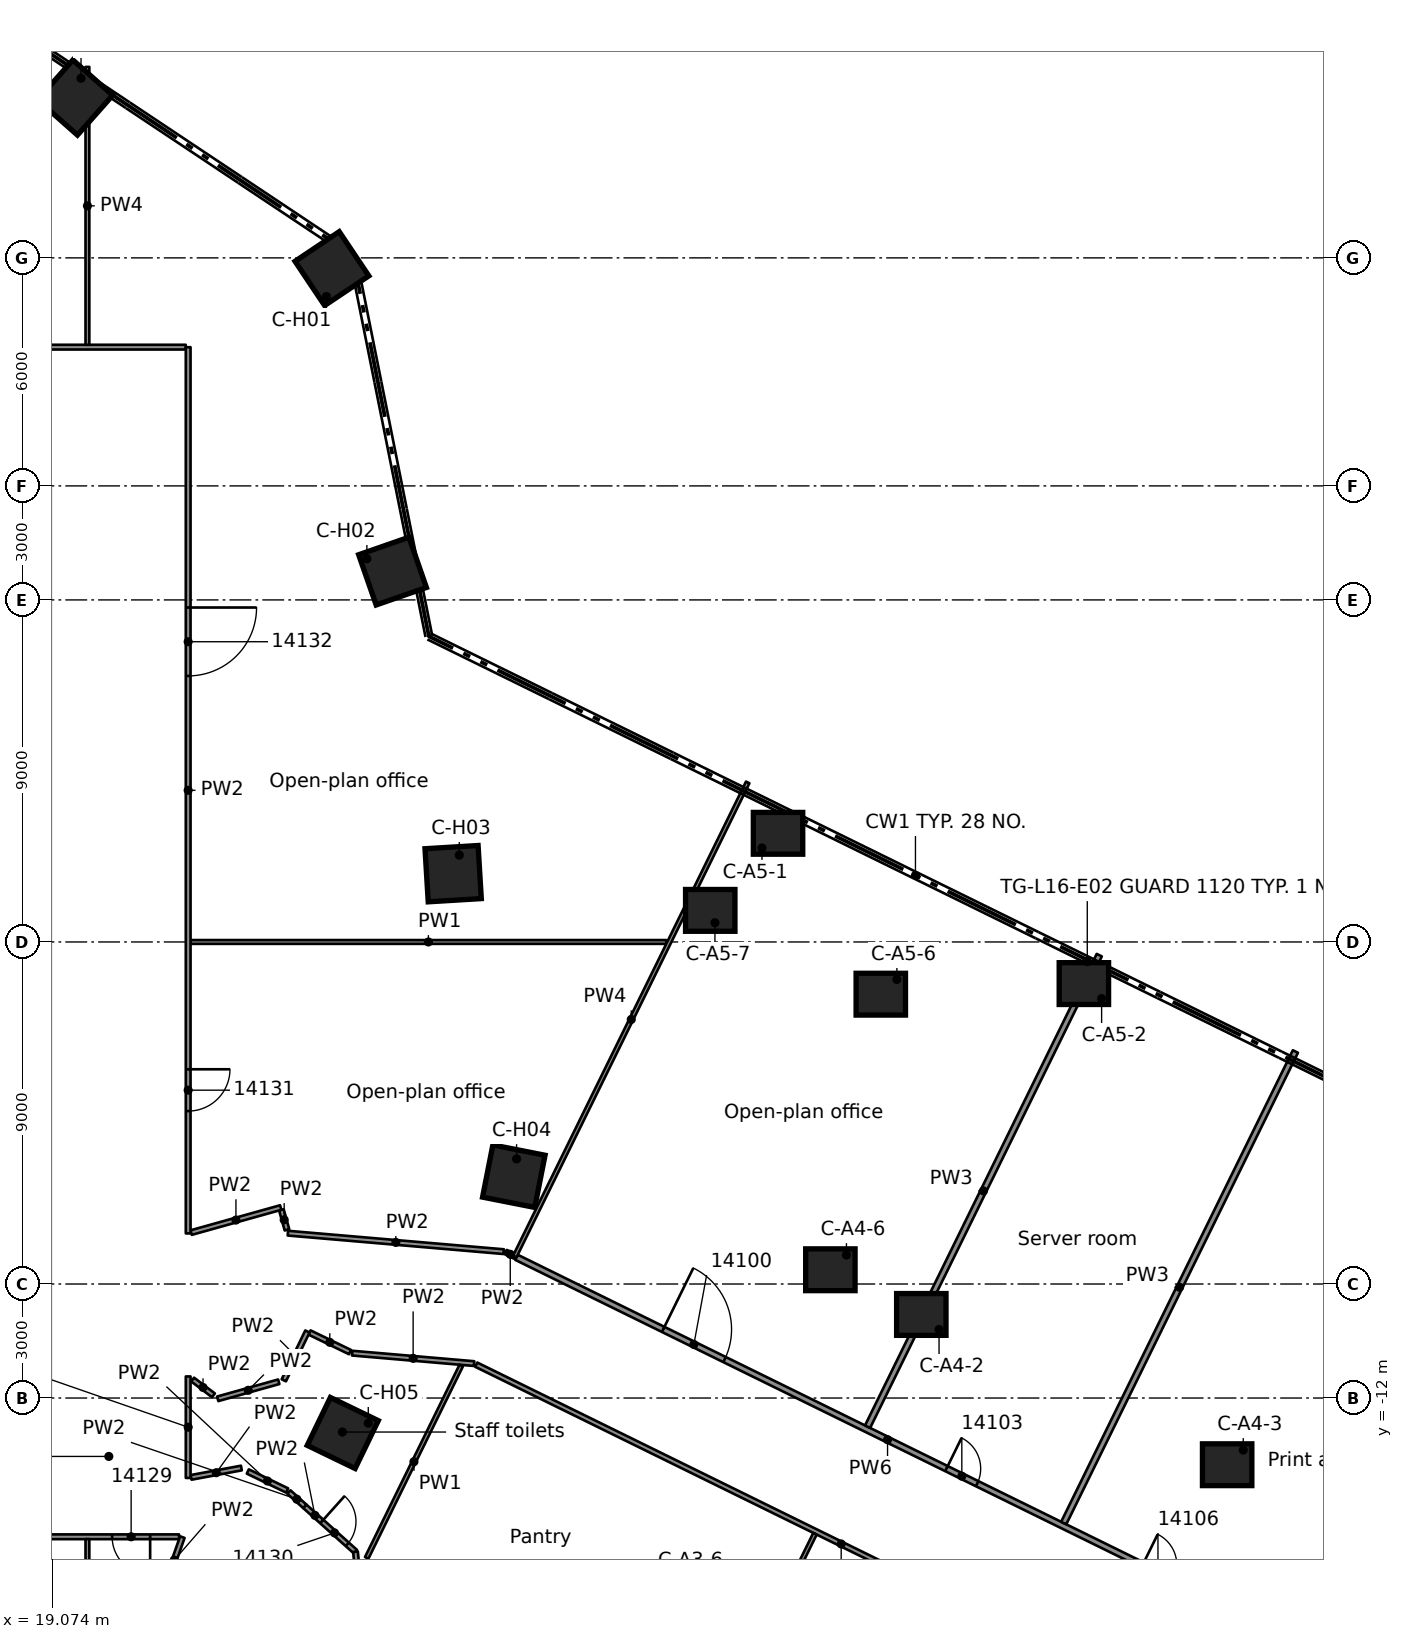
"""IFC4 building model, lengths in metres.
Left out: names, types, materials, properties, quantities, classifications, styles, units other than length and angle.
Written with IfcOpenShell. Run it as: python <this file> out.ifc"""

import sys

from ifc_helpers import new_model, si_unit, direction, frame, frame_2d, origin, origin_2d, place, context, subcontext, project, spatial, rectangle, extrude, element, fill, save


model = new_model("IFC4")
c1 = context("Model", 3, precision=1e-05, world=origin(), true_north=direction((0.0, 1.0)))
c2 = subcontext(c1, "Body", "Model", "MODEL_VIEW")
j1 = project(units=[si_unit("LENGTHUNIT", "METRE"), si_unit("PLANEANGLEUNIT", "RADIAN")], contexts=[c1])
p1 = place(None, origin())
s1 = spatial("IfcSite", under=j1, at=p1, CompositionType="ELEMENT")
p2 = place(p1, origin())
s2 = spatial("IfcBuilding", under=s1, at=p2, CompositionType="ELEMENT")
p3 = place(p2, frame((0.0, 0.0, 69.3)))
s3 = spatial("IfcBuildingStorey", under=s2, at=p3, CompositionType="ELEMENT", Elevation=69.3)
for number, where, z_axis, x_axis in (
    (1, (41.943, -9.801, 0.0), (0.0, 0.0, 1.0), (1.0, 0.0, 0.0)),
    (2, (49.991, -13.755, 0.0), (0.0, 0.0, 1.0), (1.0, 0.0, 0.0)),
    (3, (39.55, -8.625, 0.0), (0.0, 0.0, 1.0), (1.0, 0.0, 0.0)),
    (4, (38.173, 2.859, 0.0), (0.0, 0.0, 1.0), (1.0, 0.0, 0.0)),
    (5, (46.221, -1.095, 0.0), (0.0, 0.0, 1.0), (1.0, 0.0, 0.0)),
    (6, (40.877, -1.374, 0.0), (0.0, 0.0, 1.0), (1.0, 0.0, 0.0)),
    (7, (36.389, 0.831, 0.0), (0.0, 0.0, 1.0), (1.0, 0.0, 0.0)),
):
    element("IfcColumn", number, at=place(p3, frame(where, z_axis=z_axis, x_axis=x_axis)), inside=s3, PredefinedType="COLUMN", context=c2, shape_type="SweptSolid", body=[
        extrude(rectangle(XDim=1.3, YDim=1.1, at=origin_2d()), origin(), (0.0, 0.0, 1.0), 3.5),
    ])
for number, where, z_axis, x_axis in (
    (8, (26.434, 17.718, 0.0), (0.0, 0.0, 1.0), (0.831, 0.557, 0.0)),
    (9, (28.029, 9.758, 0.0), (0.0, 0.0, 1.0), (0.944, 0.329, 0.0)),
    (10, (29.624, 1.797, 0.0), (0.0, 0.0, 1.0), (0.998, 0.061, 0.0)),
    (11, (31.22, -6.163, 0.0), (0.0, 0.0, 1.0), (0.981, -0.194, 0.0)),
    (12, (26.719, -12.92, 0.0), (0.0, 0.0, 1.0), (0.9, -0.435, 0.0)),
    (13, (19.677, 22.219, 0.0), (0.0, 0.0, 1.0), (0.663, 0.749, 0.0)),
):
    element("IfcColumn", number, at=place(p3, frame(where, z_axis=z_axis, x_axis=x_axis)), inside=s3, PredefinedType="COLUMN", context=c2, shape_type="SweptSolid", body=[
        extrude(rectangle(XDim=1.4, YDim=1.4, at=origin_2d()), origin(), (0.0, 0.0, 1.0), 3.5),
    ])
p4 = place(p3, frame((25.104, -7.048, 0.0), z_axis=(0.0, 0.0, 1.0), x_axis=(0.268702664175, -0.963223171578, 0.0)))
e14 = element("IfcWall", 14, at=p4, inside=s3, PredefinedType="PARTITIONING", context=c2, shape_type="SweptSolid", body=[
    extrude(rectangle(XDim=0.547, YDim=0.125, at=frame_2d((0.273, 0.0))), origin(), (0.0, 0.0, 1.0), 3.03),
])
p5 = place(p3, frame((25.72, -14.849, 0.0), z_axis=(0.0, 0.0, 1.0), x_axis=(0.744891794115, -0.667185292899, 0.0)))
e15 = element("IfcWall", 15, at=p5, inside=s3, PredefinedType="PARTITIONING", context=c2, shape_type="SweptSolid", body=[
    extrude(rectangle(XDim=1.791, YDim=0.125, at=frame_2d((0.896, 0.0))), origin(), (0.0, 0.0, 1.0), 3.03),
])
p6 = place(p5, frame((0.6, 0.0, 0.0)))
e16 = element("IfcOpeningElement", 16, at=p6, cuts=e15, PredefinedType="OPENING", context=c2, shape_type="SweptSolid", body=[
    extrude(rectangle(XDim=0.9, YDim=2.1, at=frame_2d((0.45, 1.05))), frame((0.0, 0.073, 0.0), z_axis=(0.0, -1.0, 0.0), x_axis=(1.0, 0.0, 0.0)), (0.0, 0.0, 1.0), 0.145),
])
p7 = place(p3, frame((25.302, -14.475, 0.0), z_axis=(0.0, 0.0, 1.0), x_axis=(0.745195775022, -0.666845751947, 0.0)))
e17 = element("IfcWall", 17, at=p7, inside=s3, PredefinedType="PARTITIONING", context=c2, shape_type="SweptSolid", body=[
    extrude(rectangle(XDim=0.561, YDim=0.125, at=frame_2d((0.28, 0.0))), origin(), (0.0, 0.0, 1.0), 3.03),
])
p8 = place(p3, frame((22.768, -11.514, 0.0), z_axis=(0.0, 0.0, 1.0), x_axis=(0.797092148154, -0.603857687995, 0.0)))
e18 = element("IfcWall", 18, at=p8, inside=s3, PredefinedType="PARTITIONING", context=c2, shape_type="SweptSolid", body=[
    extrude(rectangle(XDim=0.687, YDim=0.125, at=frame_2d((0.344, 0.0))), origin(), (0.0, 0.0, 1.0), 3.03),
])
p9 = place(p3, frame((49.438, -20.558, 0.0), z_axis=(0.0, 0.0, 1.0), x_axis=(-0.897535791299, 0.440941609896, 0.0)))
e19 = element("IfcWall", 19, at=p9, inside=s3, PredefinedType="PARTITIONING", context=c2, shape_type="SweptSolid", body=[
    extrude(rectangle(XDim=21.4, YDim=0.125, at=frame_2d((10.7, 0.0))), origin(), (0.0, 0.0, 1.0), 3.03),
])
p10 = place(p9, frame((5.288, 0.0, 0.0)))
e20 = element("IfcOpeningElement", 20, at=p10, cuts=e19, PredefinedType="OPENING", context=c2, shape_type="SweptSolid", body=[
    extrude(rectangle(XDim=0.9, YDim=2.1, at=frame_2d((0.45, 1.05))), frame((0.0, 0.073, 0.0), z_axis=(0.0, -1.0, 0.0), x_axis=(1.0, 0.0, 0.0)), (0.0, 0.0, 1.0), 0.145),
])
p11 = place(p3, frame((31.291, -8.298, 0.0), z_axis=(0.0, 0.0, 1.0), x_axis=(0.897505006542, -0.441004266683, 0.0)))
e21 = element("IfcWall", 21, at=p11, inside=s3, PredefinedType="PARTITIONING", context=c2, shape_type="SweptSolid", body=[
    extrude(rectangle(XDim=21.757, YDim=0.15, at=frame_2d((10.878, 0.0))), origin(), (0.0, 0.0, 1.0), 3.03),
])
p12 = place(p11, frame((4.3, 0.0, 0.0)))
e22 = element("IfcOpeningElement", 22, at=p12, cuts=e21, PredefinedType="OPENING", context=c2, shape_type="SweptSolid", body=[
    extrude(rectangle(XDim=1.8, YDim=2.1, at=frame_2d((0.9, 1.05))), frame((0.0, 0.085, 0.0), z_axis=(0.0, -1.0, 0.0), x_axis=(1.0, 0.0, 0.0)), (0.0, 0.0, 1.0), 0.17),
])
p13 = place(p11, frame((12.606, 0.0, 0.0)))
e23 = element("IfcOpeningElement", 23, at=p13, cuts=e21, PredefinedType="OPENING", context=c2, shape_type="SweptSolid", body=[
    extrude(rectangle(XDim=0.9, YDim=2.1, at=frame_2d((0.45, 1.05))), frame((0.0, 0.085, 0.0), z_axis=(0.0, -1.0, 0.0), x_axis=(1.0, 0.0, 0.0)), (0.0, 0.0, 1.0), 0.17),
])
p14 = place(p11, frame((18.357, 0.0, 0.0)))
e24 = element("IfcOpeningElement", 24, at=p14, cuts=e21, PredefinedType="OPENING", context=c2, shape_type="SweptSolid", body=[
    extrude(rectangle(XDim=0.9, YDim=2.1, at=frame_2d((0.45, 1.05))), frame((0.0, 0.085, 0.0), z_axis=(0.0, -1.0, 0.0), x_axis=(1.0, 0.0, 0.0)), (0.0, 0.0, 1.0), 0.17),
])
p15 = place(p3, frame((31.007, -8.159, 0.0), z_axis=(0.0, 0.0, 1.0), x_axis=(0.898247549427, -0.439489863305, 0.0)))
e25 = element("IfcWall", 25, at=p15, inside=s3, PredefinedType="PARTITIONING", context=c2, shape_type="SweptSolid", body=[
    extrude(rectangle(XDim=0.266, YDim=0.125, at=frame_2d((0.133, 0.0))), origin(), (0.0, 0.0, 1.0), 3.03),
])
p16 = place(p3, frame((24.22, -13.933, 0.0), z_axis=(0.0, 0.0, 1.0), x_axis=(0.900419681582, -0.435022294853, 0.0)))
e26 = element("IfcWall", 26, at=p16, inside=s3, PredefinedType="PARTITIONING", context=c2, shape_type="SweptSolid", body=[
    extrude(rectangle(XDim=1.149, YDim=0.125, at=frame_2d((0.575, 0.0))), origin(), (0.0, 0.0, 1.0), 3.03),
])
p17 = place(p3, frame((25.845, -10.276, 0.0), z_axis=(0.0, 0.0, 1.0), x_axis=(0.900044500098, -0.435798001193, 0.0)))
e27 = element("IfcWall", 27, at=p17, inside=s3, PredefinedType="PARTITIONING", context=c2, shape_type="SweptSolid", body=[
    extrude(rectangle(XDim=1.184, YDim=0.125, at=frame_2d((0.592, 0.0))), origin(), (0.0, 0.0, 1.0), 3.03),
])
p18 = place(p3, frame((26.967, -10.819, 0.0), z_axis=(0.0, 0.0, 1.0), x_axis=(0.99634849222, -0.085379634874, 0.0)))
e28 = element("IfcWall", 28, at=p18, inside=s3, PredefinedType="PARTITIONING", context=c2, shape_type="SweptSolid", body=[
    extrude(rectangle(XDim=3.22, YDim=0.125, at=frame_2d((1.61, 0.0))), origin(), (0.0, 0.0, 1.0), 3.03),
])
p19 = place(p3, frame((25.275, -7.662, 0.0), z_axis=(0.0, 0.0, 1.0), x_axis=(0.996348730604, -0.085376852979, 0.0)))
e29 = element("IfcWall", 29, at=p19, inside=s3, PredefinedType="PARTITIONING", context=c2, shape_type="SweptSolid", body=[
    extrude(rectangle(XDim=5.702, YDim=0.125, at=frame_2d((2.851, 0.0))), origin(), (0.0, 0.0, 1.0), 3.03),
])
p20 = place(p3, frame((22.412, -15.651, 0.0), z_axis=(0.0, 0.0, 1.0), x_axis=(-1.0, 0.0, 0.0)))
e30 = element("IfcWall", 30, at=p20, inside=s3, PredefinedType="PARTITIONING", context=c2, shape_type="SweptSolid", body=[
    extrude(rectangle(XDim=10.252, YDim=0.125, at=frame_2d((5.126, 0.0))), origin(), (0.0, 0.0, 1.0), 3.03),
])
p21 = place(p20, frame((0.762, 0.0, 0.0)))
e31 = element("IfcOpeningElement", 31, at=p21, cuts=e30, PredefinedType="OPENING", context=c2, shape_type="SweptSolid", body=[
    extrude(rectangle(XDim=1.0, YDim=2.1, at=frame_2d((0.5, 1.05))), frame((0.0, 0.073, 0.0), z_axis=(0.0, -1.0, 0.0), x_axis=(1.0, 0.0, 0.0)), (0.0, 0.0, 1.0), 0.145),
])
p22 = place(p3, frame((22.713, 0.0, 0.0), z_axis=(0.0, 0.0, 1.0), x_axis=(1.0, 0.0, 0.0)))
e32 = element("IfcWall", 32, at=p22, inside=s3, PredefinedType="PARTITIONING", context=c2, shape_type="SweptSolid", body=[
    extrude(rectangle(XDim=12.519, YDim=0.1, at=frame_2d((6.26, 0.0))), origin(), (0.0, 0.0, 1.0), 3.03),
])
p23 = place(p3, frame((12.311, 15.651, 0.0), z_axis=(0.0, 0.0, 1.0), x_axis=(1.0, 0.0, 0.0)))
e33 = element("IfcWall", 33, at=p23, inside=s3, PredefinedType="PARTITIONING", context=c2, shape_type="SweptSolid", body=[
    extrude(rectangle(XDim=10.276, YDim=0.125, at=frame_2d((5.138, 0.0))), origin(), (0.0, 0.0, 1.0), 3.03),
])
p24 = place(p3, frame((22.729, -14.088, 0.0), z_axis=(0.0, 0.0, 1.0), x_axis=(0.983144472478, 0.182830375584, 0.0)))
e34 = element("IfcWall", 34, at=p24, inside=s3, PredefinedType="PARTITIONING", context=c2, shape_type="SweptSolid", body=[
    extrude(rectangle(XDim=1.345, YDim=0.125, at=frame_2d((0.672, 0.0))), origin(), (0.0, 0.0, 1.0), 3.03),
])
p25 = place(p3, frame((23.428, -12.021, 0.0), z_axis=(0.0, 0.0, 1.0), x_axis=(0.963114320188, 0.269092560745, 0.0)))
e35 = element("IfcWall", 35, at=p25, inside=s3, PredefinedType="PARTITIONING", context=c2, shape_type="SweptSolid", body=[
    extrude(rectangle(XDim=1.668, YDim=0.125, at=frame_2d((0.834, 0.0))), origin(), (0.0, 0.0, 1.0), 3.03),
])
p26 = place(p3, frame((22.73, -7.647, 0.0), z_axis=(0.0, 0.0, 1.0), x_axis=(0.9630417148, 0.269352288937, 0.0)))
e36 = element("IfcWall", 36, at=p26, inside=s3, PredefinedType="PARTITIONING", context=c2, shape_type="SweptSolid", body=[
    extrude(rectangle(XDim=2.446, YDim=0.125, at=frame_2d((1.223, 0.0))), origin(), (0.0, 0.0, 1.0), 3.03),
])
p27 = place(p3, frame((27.154, -17.074, 0.0), z_axis=(0.0, 0.0, 1.0), x_axis=(-0.09672377766, 0.995311263292, 0.0)))
e37 = element("IfcWall", 37, at=p27, inside=s3, PredefinedType="PARTITIONING", context=c2, shape_type="SweptSolid", body=[
    extrude(rectangle(XDim=1.035, YDim=0.125, at=frame_2d((0.518, 0.0))), origin(), (0.0, 0.0, 1.0), 3.03),
])
p28 = place(p3, frame((45.69, -15.29, 0.0), z_axis=(0.0, 0.0, 1.0), x_axis=(0.441022179243, 0.89749620468, 0.0)))
e38 = element("IfcWall", 38, at=p28, inside=s3, PredefinedType="PARTITIONING", context=c2, shape_type="SweptSolid", body=[
    extrude(rectangle(XDim=13.825, YDim=0.15, at=frame_2d((6.913, 0.0))), origin(), (0.0, 0.0, 1.0), 2.395),
])
p29 = place(p3, frame((36.246, -21.472, 0.0), z_axis=(0.0, 0.0, 1.0), x_axis=(0.440934319879, 0.897539372703, 0.0)))
e39 = element("IfcWall", 39, at=p29, inside=s3, PredefinedType="PARTITIONING", context=c2, shape_type="SweptSolid", body=[
    extrude(rectangle(XDim=6.574, YDim=0.1, at=frame_2d((3.287, 0.0))), origin(), (0.0, 0.0, 1.0), 3.03),
])
p30 = place(p3, frame((40.529, -12.754, 0.0), z_axis=(0.0, 0.0, 1.0), x_axis=(0.441035914892, 0.897489454966, 0.0)))
e40 = element("IfcWall", 40, at=p30, inside=s3, PredefinedType="PARTITIONING", context=c2, shape_type="SweptSolid", body=[
    extrude(rectangle(XDim=13.824, YDim=0.15, at=frame_2d((6.912, 0.0))), origin(), (0.0, 0.0, 1.0), 2.395),
])
p31 = place(p3, frame((27.349, -16.206, 0.0), z_axis=(0.0, 0.0, 1.0), x_axis=(0.441071560189, 0.897471937607, 0.0)))
e41 = element("IfcWall", 41, at=p31, inside=s3, PredefinedType="PARTITIONING", context=c2, shape_type="SweptSolid", body=[
    extrude(rectangle(XDim=5.638, YDim=0.1, at=frame_2d((2.819, 0.0))), origin(), (0.0, 0.0, 1.0), 3.03),
])
p32 = place(p3, frame((31.246, -8.276, 0.0), z_axis=(0.0, 0.0, 1.0), x_axis=(0.440984317846, 0.897514808465, 0.0)))
e42 = element("IfcWall", 42, at=p32, inside=s3, PredefinedType="PARTITIONING", context=c2, shape_type="SweptSolid", body=[
    extrude(rectangle(XDim=13.898, YDim=0.1, at=frame_2d((6.949, 0.0))), origin(), (0.0, 0.0, 1.0), 2.419),
])
p33 = place(p3, frame((25.168, -11.534, 0.0), z_axis=(0.0, 0.0, 1.0), x_axis=(0.435198706136, 0.900334430186, 0.0)))
e43 = element("IfcWall", 43, at=p33, inside=s3, PredefinedType="PARTITIONING", context=c2, shape_type="SweptSolid", body=[
    extrude(rectangle(XDim=1.427, YDim=0.125, at=frame_2d((0.714, 0.0))), origin(), (0.0, 0.0, 1.0), 3.03),
])
p34 = place(p3, frame((22.072, -16.868, 0.0), z_axis=(0.0, 0.0, 1.0), x_axis=(0.332590805705, 0.943071235889, 0.0)))
e44 = element("IfcWall", 44, at=p34, inside=s3, PredefinedType="PARTITIONING", context=c2, shape_type="SweptSolid", body=[
    extrude(rectangle(XDim=1.281, YDim=0.125, at=frame_2d((0.641, 0.0))), origin(), (0.0, 0.0, 1.0), 3.03),
])
p35 = place(p3, frame((22.651, -14.103, 0.0), z_axis=(0.0, 0.0, 1.0), x_axis=(0.0, 1.0, 0.0)))
e45 = element("IfcWall", 45, at=p35, inside=s3, PredefinedType="PARTITIONING", context=c2, shape_type="SweptSolid", body=[
    extrude(rectangle(XDim=2.671, YDim=0.125, at=frame_2d((1.335, 0.0))), origin(), (0.0, 0.0, 1.0), 3.03),
])
p36 = place(p3, frame((22.651, 15.65, 0.0), z_axis=(0.0, 0.0, 1.0), x_axis=(0.0, -1.0, 0.0)))
e46 = element("IfcWall", 46, at=p36, inside=s3, PredefinedType="PARTITIONING", context=c2, shape_type="SweptSolid", body=[
    extrude(rectangle(XDim=23.319, YDim=0.125, at=frame_2d((11.659, 0.0))), origin(), (0.0, 0.0, 1.0), 3.03),
])
p37 = place(p36, frame((19.0, 0.0, 0.0)))
e47 = element("IfcOpeningElement", 47, at=p37, cuts=e46, PredefinedType="OPENING", context=c2, shape_type="SweptSolid", body=[
    extrude(rectangle(XDim=1.1, YDim=2.1, at=frame_2d((0.55, 1.05))), frame((0.0, 0.073, 0.0), z_axis=(0.0, -1.0, 0.0), x_axis=(1.0, 0.0, 0.0)), (0.0, 0.0, 1.0), 0.145),
])
p38 = place(p36, frame((6.85, 0.0, 0.0)))
e48 = element("IfcOpeningElement", 48, at=p38, cuts=e46, PredefinedType="OPENING", context=c2, shape_type="SweptSolid", body=[
    extrude(rectangle(XDim=1.8, YDim=2.1, at=frame_2d((0.9, 1.05))), frame((0.0, 0.073, 0.0), z_axis=(0.0, -1.0, 0.0), x_axis=(1.0, 0.0, 0.0)), (0.0, 0.0, 1.0), 0.145),
])
p39 = place(p3, frame((20.0, -31.165, 0.0), z_axis=(0.0, 0.0, 1.0), x_axis=(0.0, 1.0, 0.0)))
e49 = element("IfcWall", 49, at=p39, inside=s3, PredefinedType="PARTITIONING", context=c2, shape_type="SweptSolid", body=[
    extrude(rectangle(XDim=15.452, YDim=0.1, at=frame_2d((7.726, 0.0))), origin(), (0.0, 0.0, 1.0), 3.03),
])
p40 = place(p3, frame((20.0, 15.713, 0.0), z_axis=(0.0, 0.0, 1.0), x_axis=(0.0, 1.0, 0.0)))
e50 = element("IfcWall", 50, at=p40, inside=s3, PredefinedType="PARTITIONING", context=c2, shape_type="SweptSolid", body=[
    extrude(rectangle(XDim=7.312, YDim=0.1, at=frame_2d((3.656, 0.0))), origin(), (0.0, 0.0, 1.0), 2.419),
])
p41 = place(p12, origin())
e51 = element("IfcDoor", 51, at=p41, inside=s3, OperationType="DOUBLE_DOOR_SINGLE_SWING", PredefinedType="DOOR", context=c2, shape_type="SweptSolid", body=[
    extrude(rectangle(XDim=1.8, YDim=2.1, at=frame_2d((0.9, 1.05))), frame((0.0, 0.025, 0.0), z_axis=(0.0, -1.0, 0.0), x_axis=(1.0, 0.0, 0.0)), (0.0, 0.0, 1.0), 0.05),
])
fill(e22, e51)
p42 = place(p13, origin())
e52 = element("IfcDoor", 52, at=p42, inside=s3, OperationType="SINGLE_SWING_RIGHT", PredefinedType="DOOR", context=c2, shape_type="SweptSolid", body=[
    extrude(rectangle(XDim=0.9, YDim=2.1, at=frame_2d((0.45, 1.05))), frame((0.0, 0.025, 0.0), z_axis=(0.0, -1.0, 0.0), x_axis=(1.0, 0.0, 0.0)), (0.0, 0.0, 1.0), 0.05),
])
fill(e23, e52)
p43 = place(p21, origin())
e53 = element("IfcDoor", 53, at=p43, inside=s3, OperationType="SINGLE_SWING_LEFT", PredefinedType="DOOR", context=c2, shape_type="SweptSolid", body=[
    extrude(rectangle(XDim=1.0, YDim=2.1, at=frame_2d((0.5, 1.05))), frame((0.0, 0.025, 0.0), z_axis=(0.0, -1.0, 0.0), x_axis=(1.0, 0.0, 0.0)), (0.0, 0.0, 1.0), 0.05),
])
fill(e31, e53)
p44 = place(p6, origin())
e54 = element("IfcDoor", 54, at=p44, inside=s3, OperationType="SINGLE_SWING_RIGHT", PredefinedType="DOOR", context=c2, shape_type="SweptSolid", body=[
    extrude(rectangle(XDim=0.9, YDim=2.1, at=frame_2d((0.45, 1.05))), frame((0.0, 0.025, 0.0), z_axis=(0.0, -1.0, 0.0), x_axis=(1.0, 0.0, 0.0)), (0.0, 0.0, 1.0), 0.05),
])
fill(e16, e54)
p45 = place(p37, origin())
e55 = element("IfcDoor", 55, at=p45, inside=s3, OperationType="SINGLE_SWING_RIGHT", PredefinedType="DOOR", context=c2, shape_type="SweptSolid", body=[
    extrude(rectangle(XDim=1.1, YDim=2.1, at=frame_2d((0.55, 1.05))), frame((0.0, 0.025, 0.0), z_axis=(0.0, -1.0, 0.0), x_axis=(1.0, 0.0, 0.0)), (0.0, 0.0, 1.0), 0.05),
])
fill(e47, e55)
p46 = place(p38, origin())
e56 = element("IfcDoor", 56, at=p46, inside=s3, OperationType="DOUBLE_DOOR_SINGLE_SWING", PredefinedType="DOOR", context=c2, shape_type="SweptSolid", body=[
    extrude(rectangle(XDim=1.8, YDim=2.1, at=frame_2d((0.9, 1.05))), frame((0.0, 0.025, 0.0), z_axis=(0.0, -1.0, 0.0), x_axis=(1.0, 0.0, 0.0)), (0.0, 0.0, 1.0), 0.05),
])
fill(e48, e56)
save(model, sys.argv[1])
